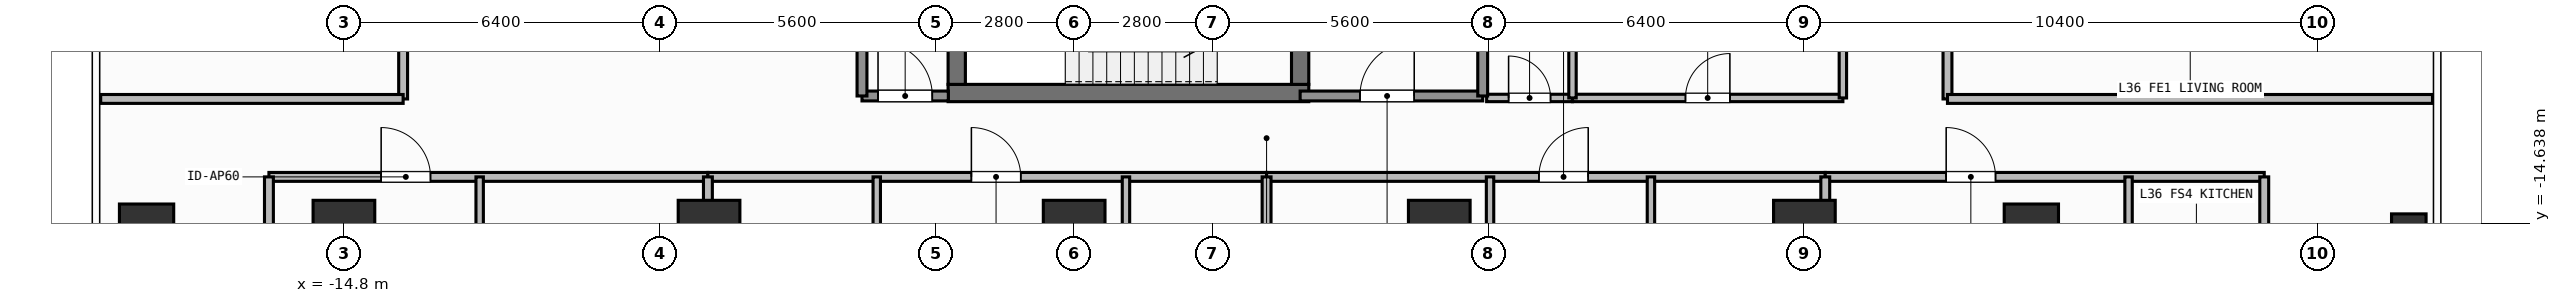
"""IFC4 building model, lengths in metres.
Left out: names, types, materials, properties, quantities, classifications, styles, units other than length and angle.
Written with IfcOpenShell. Run it as: python <this file> out.ifc"""

import sys

from ifc_helpers import new_model, si_unit, direction, frame, frame_2d, origin, origin_2d, place, context, subcontext, project, spatial, rectangle, hollow_rectangle, extrude, element, fill, save


model = new_model("IFC4")
c1 = context("Model", 3, precision=1e-05, world=origin(), true_north=direction((0.0, 1.0)))
c2 = subcontext(c1, "Body", "Model", "MODEL_VIEW")
j1 = project(units=[si_unit("LENGTHUNIT", "METRE"), si_unit("PLANEANGLEUNIT", "RADIAN")], contexts=[c1])
p1 = place(None, origin())
s1 = spatial("IfcSite", under=j1, at=p1, CompositionType="ELEMENT")
p2 = place(p1, origin())
s2 = spatial("IfcBuilding", under=s1, at=p2, CompositionType="ELEMENT")
p3 = place(p2, frame((0.0, 0.0, 144.6)))
s3 = spatial("IfcBuildingStorey", under=s2, at=p3, CompositionType="ELEMENT", Elevation=144.6)
p4 = place(p3, frame((-2.555, -12.0, 0.0), z_axis=(0.0, 0.0, 1.0), x_axis=(1.0, 0.0, 0.0)))
e1 = element("IfcWall", 1, at=p4, inside=s3, PredefinedType="SHEAR", context=c2, shape_type="SweptSolid", body=[
    extrude(rectangle(XDim=7.31, YDim=0.35, at=frame_2d((3.655, 0.0))), origin(), (0.0, 0.0, 1.0), 3.9),
])
p5 = place(p3, frame((-2.38, -11.825, 0.0), z_axis=(0.0, 0.0, 1.0), x_axis=(0.0, 1.0, 0.0)))
e2 = element("IfcWall", 2, at=p5, inside=s3, PredefinedType="SHEAR", context=c2, shape_type="SweptSolid", body=[
    extrude(rectangle(XDim=2.925, YDim=0.35, at=frame_2d((1.462, 0.0))), origin(), (0.0, 0.0, 1.0), 3.9),
])
p6 = place(p3, frame((4.58, -8.9, 0.0), z_axis=(0.0, 0.0, 1.0), x_axis=(0.0, -1.0, 0.0)))
e3 = element("IfcWall", 3, at=p6, inside=s3, PredefinedType="SHEAR", context=c2, shape_type="SweptSolid", body=[
    extrude(rectangle(XDim=2.925, YDim=0.35, at=frame_2d((1.462, 0.0))), origin(), (0.0, 0.0, 1.0), 3.9),
])
p7 = place(p6, frame((0.913, 0.0, 0.0)))
e4 = element("IfcOpeningElement", 4, at=p7, cuts=e3, PredefinedType="OPENING", context=c2, shape_type="SweptSolid", body=[
    extrude(rectangle(XDim=1.1, YDim=2.15, at=frame_2d((0.55, 1.075))), frame((0.0, 0.185, 0.0), z_axis=(0.0, -1.0, 0.0), x_axis=(1.0, 0.0, 0.0)), (0.0, 0.0, 1.0), 0.37),
])
for number, where, z_axis, x_axis in (
    (5, (-14.8, -14.8, 0.0), (0.0, 0.0, 1.0), (1.0, 0.0, 0.0)),
    (6, (-7.4, -14.8, 0.0), (0.0, 0.0, 1.0), (1.0, 0.0, 0.0)),
    (7, (0.0, -14.8, 0.0), (0.0, 0.0, 1.0), (1.0, 0.0, 0.0)),
    (8, (7.4, -14.8, 0.0), (0.0, 0.0, 1.0), (1.0, 0.0, 0.0)),
    (9, (14.8, -14.8, 0.0), (0.0, 0.0, 1.0), (1.0, 0.0, 0.0)),
):
    element("IfcColumn", number, at=place(p3, frame(where, z_axis=z_axis, x_axis=x_axis)), inside=s3, PredefinedType="COLUMN", context=c2, shape_type="SweptSolid", body=[
        extrude(rectangle(XDim=1.25, YDim=1.25, at=origin_2d()), origin(), (0.0, 0.0, 1.0), 3.9),
    ])
for number, where, z_axis, x_axis in (
    (10, (-18.8, -14.8, 0.0), (0.0, 0.0, 1.0), (1.0, 0.0, 0.0)),
    (11, (19.4, -14.8, 0.0), (0.0, 0.0, 1.0), (1.0, 0.0, 0.0)),
):
    element("IfcColumn", number, at=place(p3, frame(where, z_axis=z_axis, x_axis=x_axis)), inside=s3, PredefinedType="COLUMN", context=c2, shape_type="SweptSolid", body=[
        extrude(rectangle(XDim=1.1, YDim=1.1, at=origin_2d()), origin(), (0.0, 0.0, 1.0), 3.9),
    ])
p8 = place(p3, frame((27.05, -14.8, 0.0), z_axis=(0.0, 0.0, 1.0), x_axis=(1.0, 0.0, 0.0)))
e12 = element("IfcColumn", 12, at=p8, inside=s3, PredefinedType="COLUMN", context=c2, shape_type="SweptSolid", body=[
    extrude(hollow_rectangle(XDim=0.7, YDim=0.7, WallThickness=0.032, at=origin_2d()), origin(), (0.0, 0.0, 1.0), 3.9),
])
p9 = place(p3, frame((4.58, -12.06, 0.0), z_axis=(0.0, 0.0, 1.0), x_axis=(1.0, 0.0, 0.0)))
e13 = element("IfcWall", 13, at=p9, inside=s3, PredefinedType="SOLIDWALL", context=c2, shape_type="SweptSolid", body=[
    extrude(rectangle(XDim=3.7, YDim=0.2, at=frame_2d((1.85, 0.0))), origin(), (0.0, 0.0, 1.0), 3.68),
])
p10 = place(p9, frame((1.212, 0.0, 0.0)))
e14 = element("IfcOpeningElement", 14, at=p10, cuts=e13, PredefinedType="OPENING", context=c2, shape_type="SweptSolid", body=[
    extrude(rectangle(XDim=1.1, YDim=2.15, at=frame_2d((0.55, 1.075))), frame((0.0, 0.11, 0.0), z_axis=(0.0, -1.0, 0.0), x_axis=(1.0, 0.0, 0.0)), (0.0, 0.0, 1.0), 0.22),
])
p11 = place(p3, frame((-4.3, -12.06, 0.0), z_axis=(0.0, 0.0, 1.0), x_axis=(1.0, 0.0, 0.0)))
e15 = element("IfcWall", 15, at=p11, inside=s3, PredefinedType="SOLIDWALL", context=c2, shape_type="SweptSolid", body=[
    extrude(rectangle(XDim=1.75, YDim=0.2, at=frame_2d((0.875, 0.0))), origin(), (0.0, 0.0, 1.0), 3.68),
])
p12 = place(p11, frame((0.325, 0.0, 0.0)))
e16 = element("IfcOpeningElement", 16, at=p12, cuts=e15, PredefinedType="OPENING", context=c2, shape_type="SweptSolid", body=[
    extrude(rectangle(XDim=1.1, YDim=2.15, at=frame_2d((0.55, 1.075))), frame((0.0, 0.11, 0.0), z_axis=(0.0, -1.0, 0.0), x_axis=(1.0, 0.0, 0.0)), (0.0, 0.0, 1.0), 0.22),
])
p13 = place(p3, frame((8.36, -12.1, 0.0), z_axis=(0.0, 0.0, 1.0), x_axis=(1.0, 0.0, 0.0)))
e17 = element("IfcWall", 17, at=p13, inside=s3, PredefinedType="PARTITIONING", context=c2, shape_type="SweptSolid", body=[
    extrude(rectangle(XDim=1.74, YDim=0.15, at=frame_2d((0.87, 0.0))), origin(), (0.0, 0.0, 1.0), 3.68),
])
p14 = place(p13, frame((0.445, 0.0, 0.0)))
e18 = element("IfcOpeningElement", 18, at=p14, cuts=e17, PredefinedType="OPENING", context=c2, shape_type="SweptSolid", body=[
    extrude(rectangle(XDim=0.85, YDim=2.1, at=frame_2d((0.425, 1.05))), frame((0.0, 0.085, 0.0), z_axis=(0.0, -1.0, 0.0), x_axis=(1.0, 0.0, 0.0)), (0.0, 0.0, 1.0), 0.17),
])
p15 = place(p3, frame((10.1, -12.1, 0.0), z_axis=(0.0, 0.0, 1.0), x_axis=(1.0, 0.0, 0.0)))
e19 = element("IfcWall", 19, at=p15, inside=s3, PredefinedType="PARTITIONING", context=c2, shape_type="SweptSolid", body=[
    extrude(rectangle(XDim=5.48, YDim=0.15, at=frame_2d((2.74, 0.0))), origin(), (0.0, 0.0, 1.0), 3.68),
])
p16 = place(p15, frame((2.29, 0.0, 0.0)))
e20 = element("IfcOpeningElement", 20, at=p16, cuts=e19, PredefinedType="OPENING", context=c2, shape_type="SweptSolid", body=[
    extrude(rectangle(XDim=0.9, YDim=2.1, at=frame_2d((0.45, 1.05))), frame((0.0, 0.085, 0.0), z_axis=(0.0, -1.0, 0.0), x_axis=(1.0, 0.0, 0.0)), (0.0, 0.0, 1.0), 0.17),
])
p17 = place(p3, frame((-16.32, -13.7, 0.0), z_axis=(0.0, 0.0, 1.0), x_axis=(1.0, 0.0, 0.0)))
e21 = element("IfcWall", 21, at=p17, inside=s3, PredefinedType="PARTITIONING", context=c2, shape_type="SweptSolid", body=[
    extrude(rectangle(XDim=8.897, YDim=0.18, at=frame_2d((4.448, 0.0))), origin(), (0.0, 0.0, 1.0), 3.68),
])
p18 = place(p17, frame((2.274, 0.0, 0.0)))
e22 = element("IfcOpeningElement", 22, at=p18, cuts=e21, PredefinedType="OPENING", context=c2, shape_type="SweptSolid", body=[
    extrude(rectangle(XDim=1.0, YDim=2.2, at=frame_2d((0.5, 1.1))), frame((0.0, 0.1, 0.0), z_axis=(0.0, -1.0, 0.0), x_axis=(1.0, 0.0, 0.0)), (0.0, 0.0, 1.0), 0.2),
])
p19 = place(p3, frame((-12.049, -16.838, 0.0), z_axis=(0.0, 0.0, 1.0), x_axis=(0.0, 1.0, 0.0)))
e23 = element("IfcWall", 23, at=p19, inside=s3, PredefinedType="PARTITIONING", context=c2, shape_type="SweptSolid", body=[
    extrude(rectangle(XDim=3.138, YDim=0.15, at=frame_2d((1.569, 0.0))), origin(), (0.0, 0.0, 1.0), 3.68),
])
p20 = place(p19, frame((1.233, 0.0, 0.0)))
e24 = element("IfcOpeningElement", 24, at=p20, cuts=e23, PredefinedType="OPENING", context=c2, shape_type="SweptSolid", body=[
    extrude(rectangle(XDim=0.85, YDim=2.1, at=frame_2d((0.425, 1.05))), frame((0.0, 0.085, 0.0), z_axis=(0.0, -1.0, 0.0), x_axis=(1.0, 0.0, 0.0)), (0.0, 0.0, 1.0), 0.17),
])
p21 = place(p3, frame((-7.423, -13.7, 0.0), z_axis=(0.0, 0.0, 1.0), x_axis=(1.0, 0.0, 0.0)))
e25 = element("IfcWall", 25, at=p21, inside=s3, PredefinedType="PARTITIONING", context=c2, shape_type="SweptSolid", body=[
    extrude(rectangle(XDim=11.323, YDim=0.18, at=frame_2d((5.662, 0.0))), origin(), (0.0, 0.0, 1.0), 3.68),
])
p22 = place(p21, frame((5.34, 0.0, 0.0)))
e26 = element("IfcOpeningElement", 26, at=p22, cuts=e25, PredefinedType="OPENING", context=c2, shape_type="SweptSolid", body=[
    extrude(rectangle(XDim=1.0, YDim=2.2, at=frame_2d((0.5, 1.1))), frame((0.0, 0.1, 0.0), z_axis=(0.0, -1.0, 0.0), x_axis=(1.0, 0.0, 0.0)), (0.0, 0.0, 1.0), 0.2),
])
p23 = place(p3, frame((-4.001, -19.545, 0.0), z_axis=(0.0, 0.0, 1.0), x_axis=(0.0, 1.0, 0.0)))
e27 = element("IfcWall", 27, at=p23, inside=s3, PredefinedType="PARTITIONING", context=c2, shape_type="SweptSolid", body=[
    extrude(rectangle(XDim=5.845, YDim=0.15, at=frame_2d((2.922, 0.0))), origin(), (0.0, 0.0, 1.0), 3.68),
])
p24 = place(p23, frame((2.498, 0.0, 0.0)))
e28 = element("IfcOpeningElement", 28, at=p24, cuts=e27, PredefinedType="OPENING", context=c2, shape_type="SweptSolid", body=[
    extrude(rectangle(XDim=0.85, YDim=2.1, at=frame_2d((0.425, 1.05))), frame((0.0, 0.085, 0.0), z_axis=(0.0, -1.0, 0.0), x_axis=(1.0, 0.0, 0.0)), (0.0, 0.0, 1.0), 0.17),
])
p25 = place(p3, frame((1.05, -19.545, 0.0), z_axis=(0.0, 0.0, 1.0), x_axis=(0.0, 1.0, 0.0)))
e29 = element("IfcWall", 29, at=p25, inside=s3, PredefinedType="PARTITIONING", context=c2, shape_type="SweptSolid", body=[
    extrude(rectangle(XDim=5.845, YDim=0.15, at=frame_2d((2.922, 0.0))), origin(), (0.0, 0.0, 1.0), 3.68),
])
p26 = place(p25, frame((2.498, 0.0, 0.0)))
e30 = element("IfcOpeningElement", 30, at=p26, cuts=e29, PredefinedType="OPENING", context=c2, shape_type="SweptSolid", body=[
    extrude(rectangle(XDim=0.85, YDim=2.1, at=frame_2d((0.425, 1.05))), frame((0.0, 0.085, 0.0), z_axis=(0.0, -1.0, 0.0), x_axis=(1.0, 0.0, 0.0)), (0.0, 0.0, 1.0), 0.17),
])
p27 = place(p3, frame((3.9, -13.7, 0.0), z_axis=(0.0, 0.0, 1.0), x_axis=(1.0, 0.0, 0.0)))
e31 = element("IfcWall", 31, at=p27, inside=s3, PredefinedType="PARTITIONING", context=c2, shape_type="SweptSolid", body=[
    extrude(rectangle(XDim=11.323, YDim=0.18, at=frame_2d((5.662, 0.0))), origin(), (0.0, 0.0, 1.0), 3.68),
])
p28 = place(p27, frame((5.519, 0.0, 0.0)))
e32 = element("IfcOpeningElement", 32, at=p28, cuts=e31, PredefinedType="OPENING", context=c2, shape_type="SweptSolid", body=[
    extrude(rectangle(XDim=1.0, YDim=2.2, at=frame_2d((0.5, 1.1))), frame((0.0, 0.1, 0.0), z_axis=(0.0, -1.0, 0.0), x_axis=(1.0, 0.0, 0.0)), (0.0, 0.0, 1.0), 0.2),
])
p29 = place(p3, frame((8.429, -19.39, 0.0), z_axis=(0.0, 0.0, 1.0), x_axis=(0.0, 1.0, 0.0)))
e33 = element("IfcWall", 33, at=p29, inside=s3, PredefinedType="PARTITIONING", context=c2, shape_type="SweptSolid", body=[
    extrude(rectangle(XDim=5.69, YDim=0.15, at=frame_2d((2.845, 0.0))), origin(), (0.0, 0.0, 1.0), 3.68),
])
p30 = place(p29, frame((2.941, 0.0, 0.0)))
e34 = element("IfcOpeningElement", 34, at=p30, cuts=e33, PredefinedType="OPENING", context=c2, shape_type="SweptSolid", body=[
    extrude(rectangle(XDim=0.85, YDim=2.1, at=frame_2d((0.425, 1.05))), frame((0.0, 0.085, 0.0), z_axis=(0.0, -1.0, 0.0), x_axis=(1.0, 0.0, 0.0)), (0.0, 0.0, 1.0), 0.17),
])
p31 = place(p3, frame((11.69, -19.39, 0.0), z_axis=(0.0, 0.0, 1.0), x_axis=(0.0, 1.0, 0.0)))
e35 = element("IfcWall", 35, at=p31, inside=s3, PredefinedType="PARTITIONING", context=c2, shape_type="SweptSolid", body=[
    extrude(rectangle(XDim=5.69, YDim=0.15, at=frame_2d((2.845, 0.0))), origin(), (0.0, 0.0, 1.0), 3.68),
])
p32 = place(p31, frame((2.42, 0.0, 0.0)))
e36 = element("IfcOpeningElement", 36, at=p32, cuts=e35, PredefinedType="OPENING", context=c2, shape_type="SweptSolid", body=[
    extrude(rectangle(XDim=0.85, YDim=2.1, at=frame_2d((0.425, 1.05))), frame((0.0, 0.085, 0.0), z_axis=(0.0, -1.0, 0.0), x_axis=(1.0, 0.0, 0.0)), (0.0, 0.0, 1.0), 0.17),
])
p33 = place(p3, frame((15.223, -13.7, 0.0), z_axis=(0.0, 0.0, 1.0), x_axis=(1.0, 0.0, 0.0)))
e37 = element("IfcWall", 37, at=p33, inside=s3, PredefinedType="PARTITIONING", context=c2, shape_type="SweptSolid", body=[
    extrude(rectangle(XDim=8.897, YDim=0.18, at=frame_2d((4.449, 0.0))), origin(), (0.0, 0.0, 1.0), 3.68),
])
p34 = place(p33, frame((2.451, 0.0, 0.0)))
e38 = element("IfcOpeningElement", 38, at=p34, cuts=e37, PredefinedType="OPENING", context=c2, shape_type="SweptSolid", body=[
    extrude(rectangle(XDim=1.0, YDim=2.2, at=frame_2d((0.5, 1.1))), frame((0.0, 0.1, 0.0), z_axis=(0.0, -1.0, 0.0), x_axis=(1.0, 0.0, 0.0)), (0.0, 0.0, 1.0), 0.2),
])
p35 = place(p3, frame((21.37, -16.829, 0.0), z_axis=(0.0, 0.0, 1.0), x_axis=(0.0, 1.0, 0.0)))
e39 = element("IfcWall", 39, at=p35, inside=s3, PredefinedType="PARTITIONING", context=c2, shape_type="SweptSolid", body=[
    extrude(rectangle(XDim=3.129, YDim=0.15, at=frame_2d((1.564, 0.0))), origin(), (0.0, 0.0, 1.0), 3.68),
])
p36 = place(p35, frame((0.516, 0.0, 0.0)))
e40 = element("IfcOpeningElement", 40, at=p36, cuts=e39, PredefinedType="OPENING", context=c2, shape_type="SweptSolid", body=[
    extrude(rectangle(XDim=0.85, YDim=2.1, at=frame_2d((0.425, 1.05))), frame((0.0, 0.085, 0.0), z_axis=(0.0, -1.0, 0.0), x_axis=(1.0, 0.0, 0.0)), (0.0, 0.0, 1.0), 0.17),
])
p37 = place(p3, frame((-13.6, -12.12, 0.0), z_axis=(0.0, 0.0, 1.0), x_axis=(0.0, 1.0, 0.0)))
e41 = element("IfcWall", 41, at=p37, inside=s3, PredefinedType="PARTITIONING", context=c2, shape_type="SweptSolid", body=[
    extrude(rectangle(XDim=9.534, YDim=0.18, at=frame_2d((4.767, 0.0))), origin(), (0.0, 0.0, 1.0), 3.68),
])
p38 = place(p37, frame((1.41, 0.0, 0.0)))
e42 = element("IfcOpeningElement", 42, at=p38, cuts=e41, PredefinedType="OPENING", context=c2, shape_type="SweptSolid", body=[
    extrude(rectangle(XDim=1.0, YDim=2.2, at=frame_2d((0.5, 1.1))), frame((0.0, 0.1, 0.0), z_axis=(0.0, -1.0, 0.0), x_axis=(1.0, 0.0, 0.0)), (0.0, 0.0, 1.0), 0.2),
])
p39 = place(p3, frame((17.7, -12.12, 0.0), z_axis=(0.0, 0.0, 1.0), x_axis=(0.0, 1.0, 0.0)))
e43 = element("IfcWall", 43, at=p39, inside=s3, PredefinedType="PARTITIONING", context=c2, shape_type="SweptSolid", body=[
    extrude(rectangle(XDim=7.062, YDim=0.18, at=frame_2d((3.531, 0.0))), origin(), (0.0, 0.0, 1.0), 3.68),
])
p40 = place(p39, frame((1.237, 0.0, 0.0)))
e44 = element("IfcOpeningElement", 44, at=p40, cuts=e43, PredefinedType="OPENING", context=c2, shape_type="SweptSolid", body=[
    extrude(rectangle(XDim=1.0, YDim=2.2, at=frame_2d((0.5, 1.1))), frame((0.0, 0.1, 0.0), z_axis=(0.0, -1.0, 0.0), x_axis=(1.0, 0.0, 0.0)), (0.0, 0.0, 1.0), 0.2),
])
for number, where, z_axis, x_axis in (
    (45, (8.28, -12.06, 0.0), (0.0, 0.0, 1.0), (0.0, 1.0, 0.0)),
    (46, (-4.3, -12.06, 0.0), (0.0, 0.0, 1.0), (0.0, 1.0, 0.0)),
):
    element("IfcWall", number, at=place(p3, frame(where, z_axis=z_axis, x_axis=x_axis)), inside=s3, PredefinedType="SOLIDWALL", context=c2, shape_type="SweptSolid", body=[
        extrude(rectangle(XDim=3.185, YDim=0.2, at=frame_2d((1.593, 0.0))), origin(), (0.0, 0.0, 1.0), 3.68),
    ])
p41 = place(p3, frame((10.1, -12.1, 0.0), z_axis=(0.0, 0.0, 1.0), x_axis=(0.0, 1.0, 0.0)))
e47 = element("IfcWall", 47, at=p41, inside=s3, PredefinedType="PARTITIONING", context=c2, shape_type="SweptSolid", body=[
    extrude(rectangle(XDim=2.35, YDim=0.15, at=frame_2d((1.175, 0.0))), origin(), (0.0, 0.0, 1.0), 3.68),
])
p42 = place(p3, frame((15.58, -12.1, 0.0), z_axis=(0.0, 0.0, 1.0), x_axis=(0.0, 1.0, 0.0)))
e48 = element("IfcWall", 48, at=p42, inside=s3, PredefinedType="PARTITIONING", context=c2, shape_type="SweptSolid", body=[
    extrude(rectangle(XDim=6.25, YDim=0.15, at=frame_2d((3.125, 0.0))), origin(), (0.0, 0.0, 1.0), 3.68),
])
for number, where, z_axis, x_axis in (
    (49, (-16.32, -22.51, 0.0), (0.0, 0.0, 1.0), (0.0, 1.0, 0.0)),
    (50, (24.12, -22.51, 0.0), (0.0, 0.0, 1.0), (0.0, 1.0, 0.0)),
):
    element("IfcWall", number, at=place(p3, frame(where, z_axis=z_axis, x_axis=x_axis)), inside=s3, PredefinedType="PARTITIONING", context=c2, shape_type="SweptSolid", body=[
        extrude(rectangle(XDim=8.81, YDim=0.18, at=frame_2d((4.405, 0.0))), origin(), (0.0, 0.0, 1.0), 3.68),
    ])
p43 = place(p3, frame((-7.423, -23.63, 0.0), z_axis=(0.0, 0.0, 1.0), x_axis=(0.0, 1.0, 0.0)))
e51 = element("IfcWall", 51, at=p43, inside=s3, PredefinedType="PARTITIONING", context=c2, shape_type="SweptSolid", body=[
    extrude(rectangle(XDim=9.93, YDim=0.18, at=frame_2d((4.965, 0.0))), origin(), (0.0, 0.0, 1.0), 3.082),
])
for number, where, z_axis, x_axis in (
    (52, (3.9, -23.63, 0.0), (0.0, 0.0, 1.0), (0.0, 1.0, 0.0)),
    (53, (15.223, -23.63, 0.0), (0.0, 0.0, 1.0), (0.0, 1.0, 0.0)),
):
    element("IfcWall", number, at=place(p3, frame(where, z_axis=z_axis, x_axis=x_axis)), inside=s3, PredefinedType="PARTITIONING", context=c2, shape_type="SweptSolid", body=[
        extrude(rectangle(XDim=9.93, YDim=0.18, at=frame_2d((4.965, 0.0))), origin(), (0.0, 0.0, 1.0), 3.68),
    ])
p44 = place(p3, frame((-19.73, -12.12, 0.0), z_axis=(0.0, 0.0, 1.0), x_axis=(1.0, 0.0, 0.0)))
e54 = element("IfcWall", 54, at=p44, inside=s3, PredefinedType="PARTITIONING", context=c2, shape_type="SweptSolid", body=[
    extrude(rectangle(XDim=6.13, YDim=0.18, at=frame_2d((3.065, 0.0))), origin(), (0.0, 0.0, 1.0), 3.68),
])
p45 = place(p3, frame((17.7, -12.12, 0.0), z_axis=(0.0, 0.0, 1.0), x_axis=(1.0, 0.0, 0.0)))
e55 = element("IfcWall", 55, at=p45, inside=s3, PredefinedType="PARTITIONING", context=c2, shape_type="SweptSolid", body=[
    extrude(rectangle(XDim=9.83, YDim=0.18, at=frame_2d((4.915, 0.0))), origin(), (0.0, 0.0, 1.0), 3.68),
])
p46 = place(p10, origin())
e56 = element("IfcDoor", 56, at=p46, inside=s3, OperationType="SINGLE_SWING_RIGHT", PredefinedType="DOOR", context=c2, shape_type="SweptSolid", body=[
    extrude(rectangle(XDim=1.1, YDim=2.15, at=frame_2d((0.55, 1.075))), frame((0.0, 0.025, 0.0), z_axis=(0.0, -1.0, 0.0), x_axis=(1.0, 0.0, 0.0)), (0.0, 0.0, 1.0), 0.05),
])
fill(e14, e56)
p47 = place(p12, origin())
e57 = element("IfcDoor", 57, at=p47, inside=s3, OperationType="SINGLE_SWING_LEFT", PredefinedType="DOOR", context=c2, shape_type="SweptSolid", body=[
    extrude(rectangle(XDim=1.1, YDim=2.15, at=frame_2d((0.55, 1.075))), frame((0.0, 0.025, 0.0), z_axis=(0.0, -1.0, 0.0), x_axis=(1.0, 0.0, 0.0)), (0.0, 0.0, 1.0), 0.05),
])
fill(e16, e57)
p48 = place(p14, origin())
e58 = element("IfcDoor", 58, at=p48, inside=s3, OperationType="SINGLE_SWING_LEFT", PredefinedType="DOOR", context=c2, shape_type="SweptSolid", body=[
    extrude(rectangle(XDim=0.85, YDim=2.1, at=frame_2d((0.425, 1.05))), frame((0.0, 0.025, 0.0), z_axis=(0.0, -1.0, 0.0), x_axis=(1.0, 0.0, 0.0)), (0.0, 0.0, 1.0), 0.05),
])
fill(e18, e58)
p49 = place(p16, origin())
e59 = element("IfcDoor", 59, at=p49, inside=s3, OperationType="SINGLE_SWING_RIGHT", PredefinedType="DOOR", context=c2, shape_type="SweptSolid", body=[
    extrude(rectangle(XDim=0.9, YDim=2.1, at=frame_2d((0.45, 1.05))), frame((0.0, 0.025, 0.0), z_axis=(0.0, -1.0, 0.0), x_axis=(1.0, 0.0, 0.0)), (0.0, 0.0, 1.0), 0.05),
])
fill(e20, e59)
p50 = place(p18, origin())
e60 = element("IfcDoor", 60, at=p50, inside=s3, OperationType="SINGLE_SWING_LEFT", PredefinedType="DOOR", context=c2, shape_type="SweptSolid", body=[
    extrude(rectangle(XDim=1.0, YDim=2.2, at=frame_2d((0.5, 1.1))), frame((0.0, 0.025, 0.0), z_axis=(0.0, -1.0, 0.0), x_axis=(1.0, 0.0, 0.0)), (0.0, 0.0, 1.0), 0.05),
])
fill(e22, e60)
p51 = place(p22, origin())
e61 = element("IfcDoor", 61, at=p51, inside=s3, OperationType="SINGLE_SWING_LEFT", PredefinedType="DOOR", context=c2, shape_type="SweptSolid", body=[
    extrude(rectangle(XDim=1.0, YDim=2.2, at=frame_2d((0.5, 1.1))), frame((0.0, 0.025, 0.0), z_axis=(0.0, -1.0, 0.0), x_axis=(1.0, 0.0, 0.0)), (0.0, 0.0, 1.0), 0.05),
])
fill(e26, e61)
p52 = place(p28, origin())
e62 = element("IfcDoor", 62, at=p52, inside=s3, OperationType="SINGLE_SWING_RIGHT", PredefinedType="DOOR", context=c2, shape_type="SweptSolid", body=[
    extrude(rectangle(XDim=1.0, YDim=2.2, at=frame_2d((0.5, 1.1))), frame((0.0, 0.025, 0.0), z_axis=(0.0, -1.0, 0.0), x_axis=(1.0, 0.0, 0.0)), (0.0, 0.0, 1.0), 0.05),
])
fill(e32, e62)
p53 = place(p34, origin())
e63 = element("IfcDoor", 63, at=p53, inside=s3, OperationType="SINGLE_SWING_LEFT", PredefinedType="DOOR", context=c2, shape_type="SweptSolid", body=[
    extrude(rectangle(XDim=1.0, YDim=2.2, at=frame_2d((0.5, 1.1))), frame((0.0, 0.025, 0.0), z_axis=(0.0, -1.0, 0.0), x_axis=(1.0, 0.0, 0.0)), (0.0, 0.0, 1.0), 0.05),
])
fill(e38, e63)
save(model, sys.argv[1])
